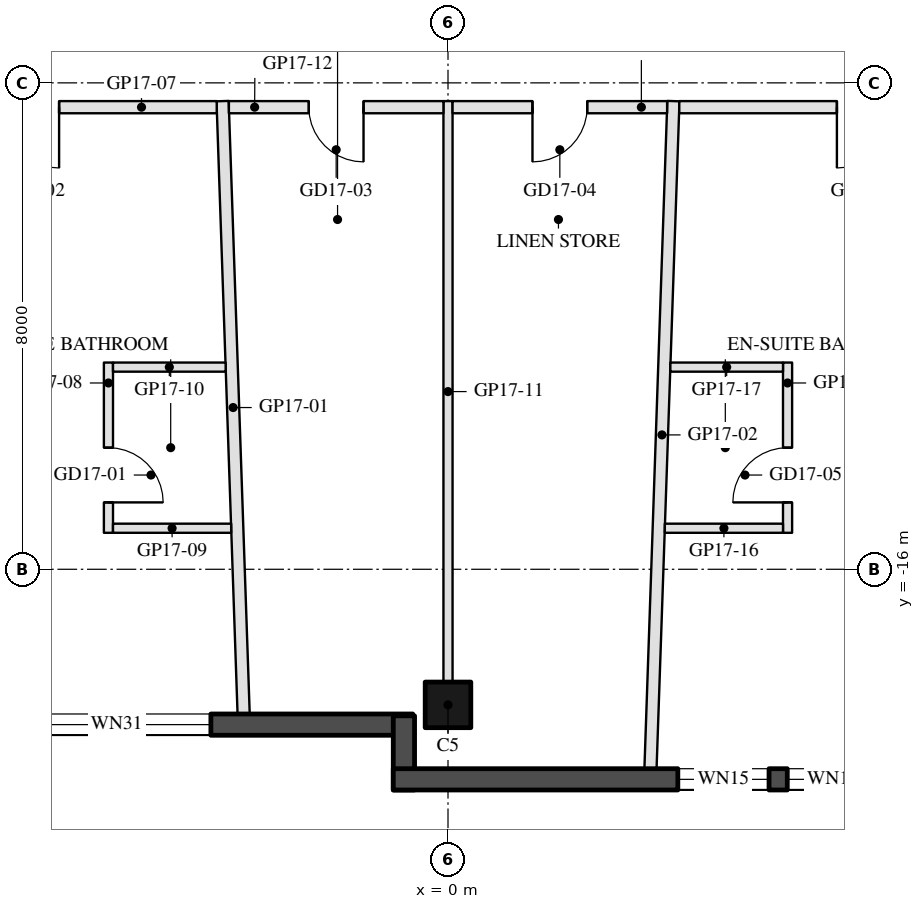
"""IFC4 building model, lengths in metres.
Left out: names, types, materials, properties, quantities, classifications, styles, units other than length and angle.
Written with IfcOpenShell. Run it as: python <this file> out.ifc"""

import sys

from ifc_helpers import new_model, si_unit, direction, frame, frame_2d, origin, origin_2d, place, context, subcontext, project, spatial, rectangle, hollow_rectangle, extrude, element, fill, save


model = new_model("IFC4")
c1 = context("Model", 3, precision=1e-05, world=origin(), true_north=direction((0.0, 1.0)))
c2 = subcontext(c1, "Body", "Model", "MODEL_VIEW")
j1 = project(units=[si_unit("LENGTHUNIT", "METRE"), si_unit("PLANEANGLEUNIT", "RADIAN")], contexts=[c1])
p1 = place(None, origin())
s1 = spatial("IfcSite", under=j1, at=p1, CompositionType="ELEMENT")
p2 = place(p1, origin())
s2 = spatial("IfcBuilding", under=s1, at=p2, CompositionType="ELEMENT")
p3 = place(p2, frame((0.0, 0.0, 187.3)))
s3 = spatial("IfcBuildingStorey", under=s2, at=p3, CompositionType="ELEMENT", Elevation=187.3)
p4 = place(p3, frame((0.0, -18.23, 0.0), z_axis=(0.0, 0.0, 1.0), x_axis=(-1.0, 0.0, 0.0)))
e1 = element("IfcColumn", 1, at=p4, inside=s3, PredefinedType="COLUMN", context=c2, shape_type="SweptSolid", body=[
    extrude(hollow_rectangle(XDim=0.75, YDim=0.75, WallThickness=0.035, at=origin_2d()), origin(), (0.0, 0.0, 1.0), 3.7),
])
p5 = place(p3, frame((-7.32, -18.555, 0.0), z_axis=(0.0, 0.0, 1.0), x_axis=(1.0, 0.0, 0.0)))
e2 = element("IfcWall", 2, at=p5, inside=s3, PredefinedType="SOLIDWALL", context=c2, shape_type="SweptSolid", body=[
    extrude(rectangle(XDim=6.74, YDim=0.35, at=frame_2d((3.37, 0.0))), origin(), (0.0, 0.0, 1.0), 3.55),
])
p6 = place(p5, frame((0.32, 0.0, 0.3)))
e3 = element("IfcOpeningElement", 3, at=p6, cuts=e2, PredefinedType="OPENING", context=c2, shape_type="SweptSolid", body=[
    extrude(rectangle(XDim=3.1, YDim=2.65, at=frame_2d((1.55, 1.325))), frame((0.0, 0.185, 0.0), z_axis=(0.0, -1.0, 0.0), x_axis=(1.0, 0.0, 0.0)), (0.0, 0.0, 1.0), 0.37),
])
p7 = place(p3, frame((-0.725, -18.41, 0.0), z_axis=(0.0, 0.0, 1.0), x_axis=(0.0, -1.0, 0.0)))
e4 = element("IfcWall", 4, at=p7, inside=s3, PredefinedType="SOLIDWALL", context=c2, shape_type="SweptSolid", body=[
    extrude(rectangle(XDim=1.22, YDim=0.35, at=frame_2d((0.61, 0.0))), origin(), (0.0, 0.0, 1.0), 3.55),
])
p8 = place(p3, frame((-0.9, -19.455, 0.0), z_axis=(0.0, 0.0, 1.0), x_axis=(1.0, 0.0, 0.0)))
e5 = element("IfcWall", 5, at=p8, inside=s3, PredefinedType="SOLIDWALL", context=c2, shape_type="SweptSolid", body=[
    extrude(rectangle(XDim=9.7, YDim=0.35, at=frame_2d((4.85, 0.0))), origin(), (0.0, 0.0, 1.0), 3.55),
])
p9 = place(p8, frame((4.68, 0.0, 0.3)))
e6 = element("IfcOpeningElement", 6, at=p9, cuts=e5, PredefinedType="OPENING", context=c2, shape_type="SweptSolid", body=[
    extrude(rectangle(XDim=1.5, YDim=2.65, at=frame_2d((0.75, 1.325))), frame((0.0, 0.185, 0.0), z_axis=(0.0, -1.0, 0.0), x_axis=(1.0, 0.0, 0.0)), (0.0, 0.0, 1.0), 0.37),
])
p10 = place(p8, frame((6.48, 0.0, 0.3)))
e7 = element("IfcOpeningElement", 7, at=p10, cuts=e5, PredefinedType="OPENING", context=c2, shape_type="SweptSolid", body=[
    extrude(rectangle(XDim=1.5, YDim=2.65, at=frame_2d((0.75, 1.325))), frame((0.0, 0.185, 0.0), z_axis=(0.0, -1.0, 0.0), x_axis=(1.0, 0.0, 0.0)), (0.0, 0.0, 1.0), 0.37),
])
p11 = place(p3, frame((-3.361, -18.38, 0.0), z_axis=(0.0, 0.0, 1.0), x_axis=(-0.034300534927, 0.999411563523, 0.0)))
e8 = element("IfcWall", 8, at=p11, inside=s3, PredefinedType="PARTITIONING", context=c2, shape_type="SweptSolid", body=[
    extrude(rectangle(XDim=10.086, YDim=0.2, at=frame_2d((5.043, 0.0))), origin(), (0.0, 0.0, 1.0), 3.06),
])
p12 = place(p3, frame((3.33, -19.28, 0.0), z_axis=(0.0, 0.0, 1.0), x_axis=(0.034288537327, 0.999411975217, 0.0)))
e9 = element("IfcWall", 9, at=p12, inside=s3, PredefinedType="PARTITIONING", context=c2, shape_type="SweptSolid", body=[
    extrude(rectangle(XDim=10.986, YDim=0.2, at=frame_2d((5.493, 0.0))), origin(), (0.0, 0.0, 1.0), 3.06),
])
p13 = place(p3, frame((-3.803, -8.4, 0.0), z_axis=(0.0, 0.0, 1.0), x_axis=(-1.0, 0.0, 0.0)))
e10 = element("IfcWall", 10, at=p13, inside=s3, PredefinedType="PARTITIONING", context=c2, shape_type="SweptSolid", body=[
    extrude(rectangle(XDim=6.185, YDim=0.2, at=frame_2d((3.092, 0.0))), origin(), (0.0, 0.0, 1.0), 2.95),
])
p14 = place(p13, frame((2.592, 0.0, 0.0)))
e11 = element("IfcOpeningElement", 11, at=p14, cuts=e10, PredefinedType="OPENING", context=c2, shape_type="SweptSolid", body=[
    extrude(rectangle(XDim=1.0, YDim=2.1, at=frame_2d((0.5, 1.05))), frame((0.0, 0.11, 0.0), z_axis=(0.0, -1.0, 0.0), x_axis=(1.0, 0.0, 0.0)), (0.0, 0.0, 1.0), 0.22),
])
p15 = place(p3, frame((-5.584, -12.6, 0.0), z_axis=(0.0, 0.0, 1.0), x_axis=(0.0, -1.0, 0.0)))
e12 = element("IfcWall", 12, at=p15, inside=s3, PredefinedType="PARTITIONING", context=c2, shape_type="SweptSolid", body=[
    extrude(rectangle(XDim=2.8, YDim=0.15, at=frame_2d((1.4, 0.0))), origin(), (0.0, 0.0, 1.0), 3.55),
])
p16 = place(p15, frame((1.4, 0.0, 0.0)))
e13 = element("IfcOpeningElement", 13, at=p16, cuts=e12, PredefinedType="OPENING", context=c2, shape_type="SweptSolid", body=[
    extrude(rectangle(XDim=0.9, YDim=2.1, at=frame_2d((0.45, 1.05))), frame((0.0, 0.085, 0.0), z_axis=(0.0, -1.0, 0.0), x_axis=(1.0, 0.0, 0.0)), (0.0, 0.0, 1.0), 0.17),
])
p17 = place(p3, frame((-5.509, -15.325, 0.0), z_axis=(0.0, 0.0, 1.0), x_axis=(1.0, 0.0, 0.0)))
e14 = element("IfcWall", 14, at=p17, inside=s3, PredefinedType="PARTITIONING", context=c2, shape_type="SweptSolid", body=[
    extrude(rectangle(XDim=1.943, YDim=0.15, at=frame_2d((0.972, 0.0))), origin(), (0.0, 0.0, 1.0), 2.95),
])
p18 = place(p3, frame((-5.509, -12.675, 0.0), z_axis=(0.0, 0.0, 1.0), x_axis=(1.0, 0.0, 0.0)))
e15 = element("IfcWall", 15, at=p18, inside=s3, PredefinedType="PARTITIONING", context=c2, shape_type="SweptSolid", body=[
    extrude(rectangle(XDim=1.853, YDim=0.15, at=frame_2d((0.926, 0.0))), origin(), (0.0, 0.0, 1.0), 2.95),
])
p19 = place(p3, frame((0.0, -17.855, 0.0), z_axis=(0.0, 0.0, 1.0), x_axis=(0.0, 1.0, 0.0)))
e16 = element("IfcWall", 16, at=p19, inside=s3, PredefinedType="PARTITIONING", context=c2, shape_type="SweptSolid", body=[
    extrude(rectangle(XDim=9.555, YDim=0.15, at=frame_2d((4.777, 0.0))), origin(), (0.0, 0.0, 1.0), 2.95),
])
p20 = place(p3, frame((-0.075, -8.4, 0.0), z_axis=(0.0, 0.0, 1.0), x_axis=(-1.0, 0.0, 0.0)))
e17 = element("IfcWall", 17, at=p20, inside=s3, PredefinedType="PARTITIONING", context=c2, shape_type="SweptSolid", body=[
    extrude(rectangle(XDim=3.529, YDim=0.2, at=frame_2d((1.764, 0.0))), origin(), (0.0, 0.0, 1.0), 2.95),
])
p21 = place(p20, frame((1.314, 0.0, 0.0)))
e18 = element("IfcOpeningElement", 18, at=p21, cuts=e17, PredefinedType="OPENING", context=c2, shape_type="SweptSolid", body=[
    extrude(rectangle(XDim=0.9, YDim=2.1, at=frame_2d((0.45, 1.05))), frame((0.0, 0.11, 0.0), z_axis=(0.0, -1.0, 0.0), x_axis=(1.0, 0.0, 0.0)), (0.0, 0.0, 1.0), 0.22),
])
p22 = place(p3, frame((3.604, -8.4, 0.0), z_axis=(0.0, 0.0, 1.0), x_axis=(-1.0, 0.0, 0.0)))
e19 = element("IfcWall", 19, at=p22, inside=s3, PredefinedType="PARTITIONING", context=c2, shape_type="SweptSolid", body=[
    extrude(rectangle(XDim=3.529, YDim=0.2, at=frame_2d((1.764, 0.0))), origin(), (0.0, 0.0, 1.0), 2.95),
])
p23 = place(p22, frame((1.314, 0.0, 0.0)))
e20 = element("IfcOpeningElement", 20, at=p23, cuts=e19, PredefinedType="OPENING", context=c2, shape_type="SweptSolid", body=[
    extrude(rectangle(XDim=0.9, YDim=2.1, at=frame_2d((0.45, 1.05))), frame((0.0, 0.11, 0.0), z_axis=(0.0, -1.0, 0.0), x_axis=(1.0, 0.0, 0.0)), (0.0, 0.0, 1.0), 0.22),
])
p24 = place(p3, frame((9.988, -8.4, 0.0), z_axis=(0.0, 0.0, 1.0), x_axis=(-1.0, 0.0, 0.0)))
e21 = element("IfcWall", 21, at=p24, inside=s3, PredefinedType="PARTITIONING", context=c2, shape_type="SweptSolid", body=[
    extrude(rectangle(XDim=6.185, YDim=0.2, at=frame_2d((3.092, 0.0))), origin(), (0.0, 0.0, 1.0), 2.95),
])
p25 = place(p24, frame((2.592, 0.0, 0.0)))
e22 = element("IfcOpeningElement", 22, at=p25, cuts=e21, PredefinedType="OPENING", context=c2, shape_type="SweptSolid", body=[
    extrude(rectangle(XDim=1.0, YDim=2.1, at=frame_2d((0.5, 1.05))), frame((0.0, 0.11, 0.0), z_axis=(0.0, -1.0, 0.0), x_axis=(1.0, 0.0, 0.0)), (0.0, 0.0, 1.0), 0.22),
])
p26 = place(p3, frame((5.584, -15.4, 0.0), z_axis=(0.0, 0.0, 1.0), x_axis=(0.0, 1.0, 0.0)))
e23 = element("IfcWall", 23, at=p26, inside=s3, PredefinedType="PARTITIONING", context=c2, shape_type="SweptSolid", body=[
    extrude(rectangle(XDim=2.8, YDim=0.15, at=frame_2d((1.4, 0.0))), origin(), (0.0, 0.0, 1.0), 3.55),
])
p27 = place(p26, frame((0.5, 0.0, 0.0)))
e24 = element("IfcOpeningElement", 24, at=p27, cuts=e23, PredefinedType="OPENING", context=c2, shape_type="SweptSolid", body=[
    extrude(rectangle(XDim=0.9, YDim=2.1, at=frame_2d((0.45, 1.05))), frame((0.0, 0.085, 0.0), z_axis=(0.0, -1.0, 0.0), x_axis=(1.0, 0.0, 0.0)), (0.0, 0.0, 1.0), 0.17),
])
p28 = place(p3, frame((3.566, -15.325, 0.0), z_axis=(0.0, 0.0, 1.0), x_axis=(1.0, 0.0, 0.0)))
e25 = element("IfcWall", 25, at=p28, inside=s3, PredefinedType="PARTITIONING", context=c2, shape_type="SweptSolid", body=[
    extrude(rectangle(XDim=1.943, YDim=0.15, at=frame_2d((0.972, 0.0))), origin(), (0.0, 0.0, 1.0), 2.95),
])
p29 = place(p3, frame((3.657, -12.675, 0.0), z_axis=(0.0, 0.0, 1.0), x_axis=(1.0, 0.0, 0.0)))
e26 = element("IfcWall", 26, at=p29, inside=s3, PredefinedType="PARTITIONING", context=c2, shape_type="SweptSolid", body=[
    extrude(rectangle(XDim=1.853, YDim=0.15, at=frame_2d((0.926, 0.0))), origin(), (0.0, 0.0, 1.0), 2.95),
])
p30 = place(p6, origin())
e27 = element("IfcWindow", 27, at=p30, inside=s3, PartitioningType="SINGLE_PANEL", PredefinedType="WINDOW", context=c2, shape_type="SweptSolid", body=[
    extrude(rectangle(XDim=3.1, YDim=2.65, at=frame_2d((1.55, 1.325))), frame((0.0, 0.03, 0.0), z_axis=(0.0, -1.0, 0.0), x_axis=(1.0, 0.0, 0.0)), (0.0, 0.0, 1.0), 0.06),
])
fill(e3, e27)
p31 = place(p9, origin())
e28 = element("IfcWindow", 28, at=p31, inside=s3, PartitioningType="SINGLE_PANEL", PredefinedType="WINDOW", context=c2, shape_type="SweptSolid", body=[
    extrude(rectangle(XDim=1.5, YDim=2.65, at=frame_2d((0.75, 1.325))), frame((0.0, 0.03, 0.0), z_axis=(0.0, -1.0, 0.0), x_axis=(1.0, 0.0, 0.0)), (0.0, 0.0, 1.0), 0.06),
])
fill(e6, e28)
p32 = place(p10, origin())
e29 = element("IfcWindow", 29, at=p32, inside=s3, PartitioningType="SINGLE_PANEL", PredefinedType="WINDOW", context=c2, shape_type="SweptSolid", body=[
    extrude(rectangle(XDim=1.5, YDim=2.65, at=frame_2d((0.75, 1.325))), frame((0.0, 0.03, 0.0), z_axis=(0.0, -1.0, 0.0), x_axis=(1.0, 0.0, 0.0)), (0.0, 0.0, 1.0), 0.06),
])
fill(e7, e29)
p33 = place(p16, origin())
e30 = element("IfcDoor", 30, at=p33, inside=s3, OperationType="SINGLE_SWING_RIGHT", PredefinedType="DOOR", context=c2, shape_type="SweptSolid", body=[
    extrude(rectangle(XDim=0.9, YDim=2.1, at=frame_2d((0.45, 1.05))), frame((0.0, 0.025, 0.0), z_axis=(0.0, -1.0, 0.0), x_axis=(1.0, 0.0, 0.0)), (0.0, 0.0, 1.0), 0.05),
])
fill(e13, e30)
p34 = place(p14, origin())
e31 = element("IfcDoor", 31, at=p34, inside=s3, OperationType="SINGLE_SWING_LEFT", PredefinedType="DOOR", context=c2, shape_type="SweptSolid", body=[
    extrude(rectangle(XDim=1.0, YDim=2.1, at=frame_2d((0.5, 1.05))), frame((0.0, 0.025, 0.0), z_axis=(0.0, -1.0, 0.0), x_axis=(1.0, 0.0, 0.0)), (0.0, 0.0, 1.0), 0.05),
])
fill(e11, e31)
p35 = place(p21, origin())
e32 = element("IfcDoor", 32, at=p35, inside=s3, OperationType="SINGLE_SWING_LEFT", PredefinedType="DOOR", context=c2, shape_type="SweptSolid", body=[
    extrude(rectangle(XDim=0.9, YDim=2.1, at=frame_2d((0.45, 1.05))), frame((0.0, 0.025, 0.0), z_axis=(0.0, -1.0, 0.0), x_axis=(1.0, 0.0, 0.0)), (0.0, 0.0, 1.0), 0.05),
])
fill(e18, e32)
p36 = place(p23, origin())
e33 = element("IfcDoor", 33, at=p36, inside=s3, OperationType="SINGLE_SWING_RIGHT", PredefinedType="DOOR", context=c2, shape_type="SweptSolid", body=[
    extrude(rectangle(XDim=0.9, YDim=2.1, at=frame_2d((0.45, 1.05))), frame((0.0, 0.025, 0.0), z_axis=(0.0, -1.0, 0.0), x_axis=(1.0, 0.0, 0.0)), (0.0, 0.0, 1.0), 0.05),
])
fill(e20, e33)
p37 = place(p27, origin())
e34 = element("IfcDoor", 34, at=p37, inside=s3, OperationType="SINGLE_SWING_LEFT", PredefinedType="DOOR", context=c2, shape_type="SweptSolid", body=[
    extrude(rectangle(XDim=0.9, YDim=2.1, at=frame_2d((0.45, 1.05))), frame((0.0, 0.025, 0.0), z_axis=(0.0, -1.0, 0.0), x_axis=(1.0, 0.0, 0.0)), (0.0, 0.0, 1.0), 0.05),
])
fill(e24, e34)
p38 = place(p25, origin())
e35 = element("IfcDoor", 35, at=p38, inside=s3, OperationType="SINGLE_SWING_RIGHT", PredefinedType="DOOR", context=c2, shape_type="SweptSolid", body=[
    extrude(rectangle(XDim=1.0, YDim=2.1, at=frame_2d((0.5, 1.05))), frame((0.0, 0.025, 0.0), z_axis=(0.0, -1.0, 0.0), x_axis=(1.0, 0.0, 0.0)), (0.0, 0.0, 1.0), 0.05),
])
fill(e22, e35)
save(model, sys.argv[1])
